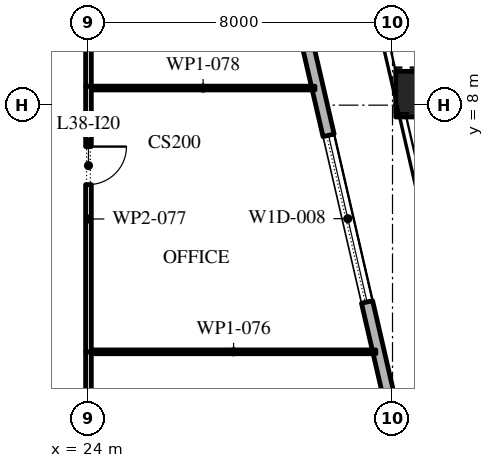
"""IFC4 building model, lengths in metres.
Left out: names, types, materials, properties, quantities, classifications, styles, units other than length and angle.
Written with IfcOpenShell. Run it as: python <this file> out.ifc"""

import sys

from ifc_helpers import new_model, si_unit, direction, frame, frame_2d, origin, origin_2d, place, context, subcontext, project, spatial, rectangle, extrude, element, fill, save


model = new_model("IFC4")
c1 = context("Model", 3, precision=1e-05, world=origin(), true_north=direction((0.0, 1.0)))
c2 = subcontext(c1, "Body", "Model", "MODEL_VIEW")
j1 = project(units=[si_unit("LENGTHUNIT", "METRE"), si_unit("PLANEANGLEUNIT", "RADIAN")], contexts=[c1])
p1 = place(None, origin())
s1 = spatial("IfcSite", under=j1, at=p1, CompositionType="ELEMENT")
p2 = place(p1, origin())
s2 = spatial("IfcBuilding", under=s1, at=p2, CompositionType="ELEMENT")
p3 = place(p2, frame((0.0, 0.0, 175.8)))
s3 = spatial("IfcBuildingStorey", under=s2, at=p3, CompositionType="ELEMENT", Elevation=175.8)
p4 = place(p3, frame((32.685, 8.29, 0.0), z_axis=(-0.005404479485, 0.023361298418, 0.999712479335), x_axis=(-0.974268511785, -0.225390476607, 0.0)))
e1 = element("IfcColumn", 1, at=p4, inside=s3, PredefinedType="COLUMN", context=c2, shape_type="SweptSolid", body=[
    extrude(rectangle(XDim=1.2, YDim=1.2, at=origin_2d()), origin(), (0.0, 0.0, 1.0), 4.201),
])
p5 = place(p3, frame((33.157, -5.092, 0.0), z_axis=(0.0, 0.0, 1.0), x_axis=(-0.224950279389, 0.974370243697, 0.0)))
e2 = element("IfcWall", 2, at=p5, inside=s3, PredefinedType="STANDARD", context=c2, shape_type="SweptSolid", body=[
    extrude(rectangle(XDim=49.5, YDim=0.3, at=frame_2d((24.75, 0.0))), origin(), (0.0, 0.0, 1.0), 4.0),
])
p6 = place(p5, frame((2.207, 0.0, 0.0)))
e3 = element("IfcOpeningElement", 3, at=p6, cuts=e2, PredefinedType="OPENING", context=c2, shape_type="SweptSolid", body=[
    extrude(rectangle(XDim=2.4, YDim=3.125, at=frame_2d((1.2, 1.562))), frame((0.0, 0.16, 0.0), z_axis=(0.0, -1.0, 0.0), x_axis=(1.0, 0.0, 0.0)), (0.0, 0.0, 1.0), 0.32),
])
p7 = place(p5, frame((8.121, 0.0, 0.45)))
e4 = element("IfcOpeningElement", 4, at=p7, cuts=e2, PredefinedType="OPENING", context=c2, shape_type="SweptSolid", body=[
    extrude(rectangle(XDim=4.5, YDim=2.875, at=frame_2d((2.25, 1.438))), frame((0.0, 0.16, 0.0), z_axis=(0.0, -1.0, 0.0), x_axis=(1.0, 0.0, 0.0)), (0.0, 0.0, 1.0), 0.32),
])
p8 = place(p5, frame((15.236, 0.0, 0.45)))
e5 = element("IfcOpeningElement", 5, at=p8, cuts=e2, PredefinedType="OPENING", context=c2, shape_type="SweptSolid", body=[
    extrude(rectangle(XDim=4.5, YDim=2.875, at=frame_2d((2.25, 1.438))), frame((0.0, 0.16, 0.0), z_axis=(0.0, -1.0, 0.0), x_axis=(1.0, 0.0, 0.0)), (0.0, 0.0, 1.0), 0.32),
])
p9 = place(p5, frame((22.35, 0.0, 0.45)))
e6 = element("IfcOpeningElement", 6, at=p9, cuts=e2, PredefinedType="OPENING", context=c2, shape_type="SweptSolid", body=[
    extrude(rectangle(XDim=4.5, YDim=3.0, at=frame_2d((2.25, 1.5))), frame((0.0, 0.16, 0.0), z_axis=(0.0, -1.0, 0.0), x_axis=(1.0, 0.0, 0.0)), (0.0, 0.0, 1.0), 0.32),
])
p10 = place(p5, frame((30.514, 0.0, 0.0)))
e7 = element("IfcOpeningElement", 7, at=p10, cuts=e2, PredefinedType="OPENING", context=c2, shape_type="SweptSolid", body=[
    extrude(rectangle(XDim=2.4, YDim=3.45, at=frame_2d((1.2, 1.725))), frame((0.0, 0.16, 0.0), z_axis=(0.0, -1.0, 0.0), x_axis=(1.0, 0.0, 0.0)), (0.0, 0.0, 1.0), 0.32),
])
p11 = place(p5, frame((36.579, 0.0, 0.45)))
e8 = element("IfcOpeningElement", 8, at=p11, cuts=e2, PredefinedType="OPENING", context=c2, shape_type="SweptSolid", body=[
    extrude(rectangle(XDim=4.5, YDim=3.05, at=frame_2d((2.25, 1.525))), frame((0.0, 0.16, 0.0), z_axis=(0.0, -1.0, 0.0), x_axis=(1.0, 0.0, 0.0)), (0.0, 0.0, 1.0), 0.32),
])
p12 = place(p5, frame((43.693, 0.0, 0.45)))
e9 = element("IfcOpeningElement", 9, at=p12, cuts=e2, PredefinedType="OPENING", context=c2, shape_type="SweptSolid", body=[
    extrude(rectangle(XDim=4.5, YDim=3.05, at=frame_2d((2.25, 1.525))), frame((0.0, 0.16, 0.0), z_axis=(0.0, -1.0, 0.0), x_axis=(1.0, 0.0, 0.0)), (0.0, 0.0, 1.0), 0.32),
])
p13 = place(p3, frame((24.0, 1.51, 0.0), z_axis=(0.0, 0.0, 1.0), x_axis=(0.0, -1.0, 0.0)))
e10 = element("IfcWall", 10, at=p13, inside=s3, PredefinedType="PARTITIONING", context=c2, shape_type="SweptSolid", body=[
    extrude(rectangle(XDim=6.435, YDim=0.15, at=frame_2d((3.218, 0.0))), origin(), (0.0, 0.0, 1.0), 4.0),
])
p14 = place(p13, frame((3.36, 0.0, 0.0)))
e11 = element("IfcOpeningElement", 11, at=p14, cuts=e10, PredefinedType="OPENING", context=c2, shape_type="SweptSolid", body=[
    extrude(rectangle(XDim=1.0, YDim=2.1, at=frame_2d((0.5, 1.05))), frame((0.0, 0.085, 0.0), z_axis=(0.0, -1.0, 0.0), x_axis=(1.0, 0.0, 0.0)), (0.0, 0.0, 1.0), 0.17),
])
p15 = place(p3, frame((24.075, 1.51, 0.0), z_axis=(0.0, 0.0, 1.0), x_axis=(1.0, 0.0, 0.0)))
e12 = element("IfcWall", 12, at=p15, inside=s3, PredefinedType="PARTITIONING", context=c2, shape_type="SweptSolid", body=[
    extrude(rectangle(XDim=7.487, YDim=0.1, at=frame_2d((3.744, 0.0))), origin(), (0.0, 0.0, 1.0), 4.0),
])
p16 = place(p3, frame((24.0, 8.5, 0.0), z_axis=(0.0, 0.0, 1.0), x_axis=(0.0, -1.0, 0.0)))
e13 = element("IfcWall", 13, at=p16, inside=s3, PredefinedType="PARTITIONING", context=c2, shape_type="SweptSolid", body=[
    extrude(rectangle(XDim=6.99, YDim=0.15, at=frame_2d((3.495, 0.0))), origin(), (0.0, 0.0, 1.0), 4.0),
])
p17 = place(p16, frame((1.59, 0.0, 0.0)))
e14 = element("IfcOpeningElement", 14, at=p17, cuts=e13, PredefinedType="OPENING", context=c2, shape_type="SweptSolid", body=[
    extrude(rectangle(XDim=1.0, YDim=2.1, at=frame_2d((0.5, 1.05))), frame((0.0, 0.085, 0.0), z_axis=(0.0, -1.0, 0.0), x_axis=(1.0, 0.0, 0.0)), (0.0, 0.0, 1.0), 0.17),
])
p18 = place(p3, frame((24.075, 8.45, 0.0), z_axis=(0.0, 0.0, 1.0), x_axis=(1.0, 0.0, 0.0)))
e15 = element("IfcWall", 15, at=p18, inside=s3, PredefinedType="PARTITIONING", context=c2, shape_type="SweptSolid", body=[
    extrude(rectangle(XDim=5.884, YDim=0.1, at=frame_2d((2.942, 0.0))), origin(), (0.0, 0.0, 1.0), 4.0),
])
p19 = place(p3, frame((24.0, 15.43, 0.0), z_axis=(0.0, 0.0, 1.0), x_axis=(0.0, -1.0, 0.0)))
e16 = element("IfcWall", 16, at=p19, inside=s3, PredefinedType="PARTITIONING", context=c2, shape_type="SweptSolid", body=[
    extrude(rectangle(XDim=6.93, YDim=0.15, at=frame_2d((3.465, 0.0))), origin(), (0.0, 0.0, 1.0), 4.0),
])
p20 = place(p19, frame((4.33, 0.0, 0.0)))
e17 = element("IfcOpeningElement", 17, at=p20, cuts=e16, PredefinedType="OPENING", context=c2, shape_type="SweptSolid", body=[
    extrude(rectangle(XDim=1.0, YDim=2.1, at=frame_2d((0.5, 1.05))), frame((0.0, 0.085, 0.0), z_axis=(0.0, -1.0, 0.0), x_axis=(1.0, 0.0, 0.0)), (0.0, 0.0, 1.0), 0.17),
])
p21 = place(p7, origin())
e18 = element("IfcWindow", 18, at=p21, inside=s3, PartitioningType="DOUBLE_PANEL_VERTICAL", PredefinedType="WINDOW", context=c2, shape_type="SweptSolid", body=[
    extrude(rectangle(XDim=4.5, YDim=2.875, at=frame_2d((2.25, 1.438))), frame((0.0, 0.03, 0.0), z_axis=(0.0, -1.0, 0.0), x_axis=(1.0, 0.0, 0.0)), (0.0, 0.0, 1.0), 0.06),
])
fill(e4, e18)
p22 = place(p17, origin())
e19 = element("IfcDoor", 19, at=p22, inside=s3, OperationType="SINGLE_SWING_RIGHT", PredefinedType="DOOR", context=c2, shape_type="SweptSolid", body=[
    extrude(rectangle(XDim=1.0, YDim=2.1, at=frame_2d((0.5, 1.05))), frame((0.0, 0.025, 0.0), z_axis=(0.0, -1.0, 0.0), x_axis=(1.0, 0.0, 0.0)), (0.0, 0.0, 1.0), 0.05),
])
fill(e14, e19)
save(model, sys.argv[1])
